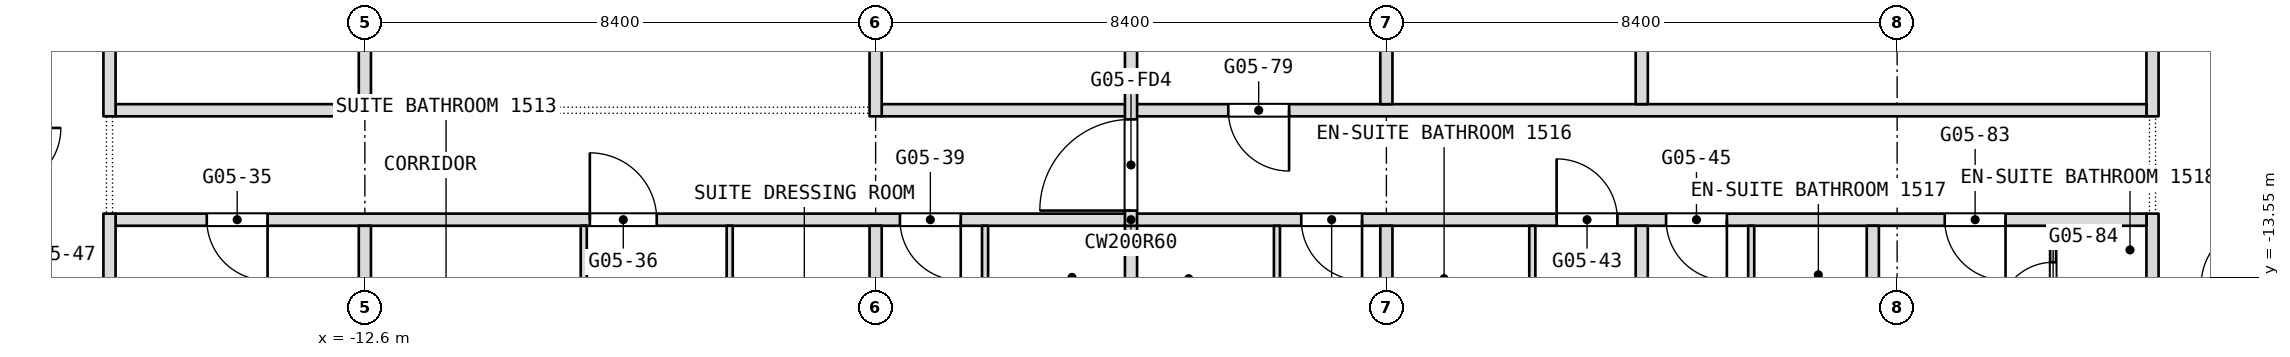
"""IFC4 building model, lengths in metres.
Left out: names, types, materials, properties, quantities, classifications, styles, units other than length and angle.
Written with IfcOpenShell. Run it as: python <this file> out.ifc"""

import sys

from ifc_helpers import new_model, si_unit, direction, frame, frame_2d, origin, place, context, subcontext, project, spatial, rectangle, extrude, element, fill, save


model = new_model("IFC4")
c1 = context("Model", 3, precision=1e-05, world=origin(), true_north=direction((0.0, 1.0)))
c2 = subcontext(c1, "Body", "Model", "MODEL_VIEW")
j1 = project(units=[si_unit("LENGTHUNIT", "METRE"), si_unit("PLANEANGLEUNIT", "RADIAN")], contexts=[c1])
p1 = place(None, origin())
s1 = spatial("IfcSite", under=j1, at=p1, CompositionType="ELEMENT")
p2 = place(p1, origin())
s2 = spatial("IfcBuilding", under=s1, at=p2, CompositionType="ELEMENT")
p3 = place(p2, frame((0.0, 0.0, 68.9)))
s3 = spatial("IfcBuildingStorey", under=s2, at=p3, CompositionType="ELEMENT", Elevation=68.9)
p4 = place(p3, frame((16.8, -17.143, 0.0), z_axis=(0.0, 0.0, 1.0), x_axis=(0.0, 1.0, 0.0)))
e1 = element("IfcWall", 1, at=p4, inside=s3, PredefinedType="PARTITIONING", context=c2, shape_type="SweptSolid", body=[
    extrude(rectangle(XDim=4.643, YDim=0.2, at=frame_2d((2.322, 0.0))), origin(), (0.0, 0.0, 1.0), 3.34),
])
p5 = place(p4, frame((0.772, 0.0, 0.0)))
e2 = element("IfcOpeningElement", 2, at=p5, cuts=e1, PredefinedType="OPENING", context=c2, shape_type="SweptSolid", body=[
    extrude(rectangle(XDim=0.9, YDim=2.1, at=frame_2d((0.45, 1.05))), frame((0.0, 0.1, 0.0), z_axis=(0.0, -1.0, 0.0), x_axis=(1.0, 0.0, 0.0)), (0.0, 0.0, 1.0), 0.2),
])
p6 = place(p3, frame((16.8, -10.9, 0.0), z_axis=(0.0, 0.0, 1.0), x_axis=(0.0, 1.0, 0.0)))
e3 = element("IfcWall", 3, at=p6, inside=s3, PredefinedType="PARTITIONING", context=c2, shape_type="SweptSolid", body=[
    extrude(rectangle(XDim=7.3, YDim=0.2, at=frame_2d((3.65, 0.0))), origin(), (0.0, 0.0, 1.0), 3.34),
])
p7 = place(p6, frame((3.15, 0.0, 0.0)))
e4 = element("IfcOpeningElement", 4, at=p7, cuts=e3, PredefinedType="OPENING", context=c2, shape_type="SweptSolid", body=[
    extrude(rectangle(XDim=1.0, YDim=2.1, at=frame_2d((0.5, 1.05))), frame((0.0, 0.1, 0.0), z_axis=(0.0, -1.0, 0.0), x_axis=(1.0, 0.0, 0.0)), (0.0, 0.0, 1.0), 0.2),
])
p8 = place(p3, frame((15.166, -15.0, 0.0), z_axis=(0.0, 0.0, 1.0), x_axis=(0.0, 1.0, 0.0)))
e5 = element("IfcWall", 5, at=p8, inside=s3, PredefinedType="PARTITIONING", context=c2, shape_type="SweptSolid", body=[
    extrude(rectangle(XDim=2.3, YDim=0.1, at=frame_2d((1.15, 0.0))), origin(), (0.0, 0.0, 1.0), 3.34),
])
p9 = place(p8, frame((0.8, 0.0, 0.0)))
e6 = element("IfcOpeningElement", 6, at=p9, cuts=e5, PredefinedType="OPENING", context=c2, shape_type="SweptSolid", body=[
    extrude(rectangle(XDim=0.9, YDim=2.1, at=frame_2d((0.45, 1.05))), frame((0.0, 0.05, 0.0), z_axis=(0.0, -1.0, 0.0), x_axis=(1.0, 0.0, 0.0)), (0.0, 0.0, 1.0), 0.1),
])
p10 = place(p3, frame((-16.7, -12.6, 0.0), z_axis=(0.0, 0.0, 1.0), x_axis=(1.0, 0.0, 0.0)))
e7 = element("IfcWall", 7, at=p10, inside=s3, PredefinedType="PARTITIONING", context=c2, shape_type="SweptSolid", body=[
    extrude(rectangle(XDim=33.4, YDim=0.2, at=frame_2d((16.7, 0.0))), origin(), (0.0, 0.0, 1.0), 3.34),
])
p11 = place(p10, frame((1.5, 0.0, 0.0)))
e8 = element("IfcOpeningElement", 8, at=p11, cuts=e7, PredefinedType="OPENING", context=c2, shape_type="SweptSolid", body=[
    extrude(rectangle(XDim=1.0, YDim=2.1, at=frame_2d((0.5, 1.05))), frame((0.0, 0.1, 0.0), z_axis=(0.0, -1.0, 0.0), x_axis=(1.0, 0.0, 0.0)), (0.0, 0.0, 1.0), 0.2),
])
p12 = place(p10, frame((7.8, 0.0, 0.0)))
e9 = element("IfcOpeningElement", 9, at=p12, cuts=e7, PredefinedType="OPENING", context=c2, shape_type="SweptSolid", body=[
    extrude(rectangle(XDim=1.1, YDim=2.1, at=frame_2d((0.55, 1.05))), frame((0.0, 0.1, 0.0), z_axis=(0.0, -1.0, 0.0), x_axis=(1.0, 0.0, 0.0)), (0.0, 0.0, 1.0), 0.2),
])
p13 = place(p10, frame((12.9, 0.0, 0.0)))
e10 = element("IfcOpeningElement", 10, at=p13, cuts=e7, PredefinedType="OPENING", context=c2, shape_type="SweptSolid", body=[
    extrude(rectangle(XDim=1.0, YDim=2.1, at=frame_2d((0.5, 1.05))), frame((0.0, 0.1, 0.0), z_axis=(0.0, -1.0, 0.0), x_axis=(1.0, 0.0, 0.0)), (0.0, 0.0, 1.0), 0.2),
])
p14 = place(p10, frame((19.5, 0.0, 0.0)))
e11 = element("IfcOpeningElement", 11, at=p14, cuts=e7, PredefinedType="OPENING", context=c2, shape_type="SweptSolid", body=[
    extrude(rectangle(XDim=1.0, YDim=2.1, at=frame_2d((0.5, 1.05))), frame((0.0, 0.1, 0.0), z_axis=(0.0, -1.0, 0.0), x_axis=(1.0, 0.0, 0.0)), (0.0, 0.0, 1.0), 0.2),
])
p15 = place(p10, frame((23.7, 0.0, 0.0)))
e12 = element("IfcOpeningElement", 12, at=p15, cuts=e7, PredefinedType="OPENING", context=c2, shape_type="SweptSolid", body=[
    extrude(rectangle(XDim=1.0, YDim=2.1, at=frame_2d((0.5, 1.05))), frame((0.0, 0.1, 0.0), z_axis=(0.0, -1.0, 0.0), x_axis=(1.0, 0.0, 0.0)), (0.0, 0.0, 1.0), 0.2),
])
p16 = place(p10, frame((25.5, 0.0, 0.0)))
e13 = element("IfcOpeningElement", 13, at=p16, cuts=e7, PredefinedType="OPENING", context=c2, shape_type="SweptSolid", body=[
    extrude(rectangle(XDim=1.0, YDim=2.1, at=frame_2d((0.5, 1.05))), frame((0.0, 0.1, 0.0), z_axis=(0.0, -1.0, 0.0), x_axis=(1.0, 0.0, 0.0)), (0.0, 0.0, 1.0), 0.2),
])
p17 = place(p10, frame((30.083, 0.0, 0.0)))
e14 = element("IfcOpeningElement", 14, at=p17, cuts=e7, PredefinedType="OPENING", context=c2, shape_type="SweptSolid", body=[
    extrude(rectangle(XDim=1.0, YDim=2.1, at=frame_2d((0.5, 1.05))), frame((0.0, 0.1, 0.0), z_axis=(0.0, -1.0, 0.0), x_axis=(1.0, 0.0, 0.0)), (0.0, 0.0, 1.0), 0.2),
])
p18 = place(p3, frame((12.2, -15.325, 0.0), z_axis=(0.0, 0.0, 1.0), x_axis=(0.0, 1.0, 0.0)))
e15 = element("IfcWall", 15, at=p18, inside=s3, PredefinedType="PARTITIONING", context=c2, shape_type="SweptSolid", body=[
    extrude(rectangle(XDim=2.625, YDim=0.2, at=frame_2d((1.312, 0.0))), origin(), (0.0, 0.0, 1.0), 3.34),
])
p19 = place(p3, frame((-16.7, -10.8, 0.0), z_axis=(0.0, 0.0, 1.0), x_axis=(1.0, 0.0, 0.0)))
e16 = element("IfcWall", 16, at=p19, inside=s3, PredefinedType="PARTITIONING", context=c2, shape_type="SweptSolid", body=[
    extrude(rectangle(XDim=4.0, YDim=0.2, at=frame_2d((2.0, 0.0))), origin(), (0.0, 0.0, 1.0), 3.34),
])
p20 = place(p3, frame((-4.1, -10.8, 0.0), z_axis=(0.0, 0.0, 1.0), x_axis=(1.0, 0.0, 0.0)))
e17 = element("IfcWall", 17, at=p20, inside=s3, PredefinedType="PARTITIONING", context=c2, shape_type="SweptSolid", body=[
    extrude(rectangle(XDim=20.8, YDim=0.2, at=frame_2d((10.4, 0.0))), origin(), (0.0, 0.0, 1.0), 3.34),
])
p21 = place(p20, frame((5.7, 0.0, 0.0)))
e18 = element("IfcOpeningElement", 18, at=p21, cuts=e17, PredefinedType="OPENING", context=c2, shape_type="SweptSolid", body=[
    extrude(rectangle(XDim=1.0, YDim=2.1, at=frame_2d((0.5, 1.05))), frame((0.0, 0.1, 0.0), z_axis=(0.0, -1.0, 0.0), x_axis=(1.0, 0.0, 0.0)), (0.0, 0.0, 1.0), 0.2),
])
p22 = place(p3, frame((10.2, -15.425, 0.0), z_axis=(0.0, 0.0, 1.0), x_axis=(0.0, 1.0, 0.0)))
e19 = element("IfcWall", 19, at=p22, inside=s3, PredefinedType="PARTITIONING", context=c2, shape_type="SweptSolid", body=[
    extrude(rectangle(XDim=2.725, YDim=0.1, at=frame_2d((1.363, 0.0))), origin(), (0.0, 0.0, 1.0), 3.34),
])
p23 = place(p3, frame((8.4, -17.7, 0.0), z_axis=(0.0, 0.0, 1.0), x_axis=(0.0, 1.0, 0.0)))
e20 = element("IfcWall", 20, at=p23, inside=s3, PredefinedType="PARTITIONING", context=c2, shape_type="SweptSolid", body=[
    extrude(rectangle(XDim=5.0, YDim=0.2, at=frame_2d((2.5, 0.0))), origin(), (0.0, 0.0, 1.0), 3.34),
])
p24 = place(p3, frame((8.4, -10.7, 0.0), z_axis=(0.0, 0.0, 1.0), x_axis=(0.0, 1.0, 0.0)))
e21 = element("IfcWall", 21, at=p24, inside=s3, PredefinedType="PARTITIONING", context=c2, shape_type="SweptSolid", body=[
    extrude(rectangle(XDim=3.6, YDim=0.2, at=frame_2d((1.8, 0.0))), origin(), (0.0, 0.0, 1.0), 3.34),
])
p25 = place(p3, frame((6.6, -15.325, 0.0), z_axis=(0.0, 0.0, 1.0), x_axis=(0.0, 1.0, 0.0)))
e22 = element("IfcWall", 22, at=p25, inside=s3, PredefinedType="PARTITIONING", context=c2, shape_type="SweptSolid", body=[
    extrude(rectangle(XDim=2.625, YDim=0.1, at=frame_2d((1.312, 0.0))), origin(), (0.0, 0.0, 1.0), 3.34),
])
p26 = place(p3, frame((4.2, -17.7, 0.0), z_axis=(0.0, 0.0, 1.0), x_axis=(0.0, 1.0, 0.0)))
e23 = element("IfcWall", 23, at=p26, inside=s3, PredefinedType="PARTITIONING", context=c2, shape_type="SweptSolid", body=[
    extrude(rectangle(XDim=5.0, YDim=0.2, at=frame_2d((2.5, 0.0))), origin(), (0.0, 0.0, 1.0), 3.34),
])
p27 = place(p3, frame((4.2, -10.7, 0.0), z_axis=(0.0, 0.0, 1.0), x_axis=(0.0, 1.0, 0.0)))
e24 = element("IfcWall", 24, at=p27, inside=s3, PredefinedType="PARTITIONING", context=c2, shape_type="SweptSolid", body=[
    extrude(rectangle(XDim=8.8, YDim=0.2, at=frame_2d((4.4, 0.0))), origin(), (0.0, 0.0, 1.0), 3.34),
])
p28 = place(p3, frame((2.4, -15.325, 0.0), z_axis=(0.0, 0.0, 1.0), x_axis=(0.0, 1.0, 0.0)))
e25 = element("IfcWall", 25, at=p28, inside=s3, PredefinedType="PARTITIONING", context=c2, shape_type="SweptSolid", body=[
    extrude(rectangle(XDim=2.625, YDim=0.1, at=frame_2d((1.312, 0.0))), origin(), (0.0, 0.0, 1.0), 3.34),
])
p29 = place(p3, frame((0.0, -17.7, 0.0), z_axis=(0.0, 0.0, 1.0), x_axis=(0.0, 1.0, 0.0)))
e26 = element("IfcWall", 26, at=p29, inside=s3, PredefinedType="PARTITIONING", context=c2, shape_type="SweptSolid", body=[
    extrude(rectangle(XDim=5.0, YDim=0.2, at=frame_2d((2.5, 0.0))), origin(), (0.0, 0.0, 1.0), 3.34),
])
p30 = place(p3, frame((0.0, -12.7, 0.0), z_axis=(0.0, 0.0, 1.0), x_axis=(0.0, 1.0, 0.0)))
e27 = element("IfcWall", 27, at=p30, inside=s3, PredefinedType="PARTITIONING", context=c2, shape_type="SweptSolid", body=[
    extrude(rectangle(XDim=12.7, YDim=0.2, at=frame_2d((6.35, 0.0))), origin(), (0.0, 0.0, 1.0), 3.34),
])
p31 = place(p30, frame((11.05, 0.0, 0.0)))
e28 = element("IfcOpeningElement", 28, at=p31, cuts=e27, PredefinedType="OPENING", context=c2, shape_type="SweptSolid", body=[
    extrude(rectangle(XDim=1.5, YDim=2.1, at=frame_2d((0.75, 1.05))), frame((0.0, 0.1, 0.0), z_axis=(0.0, -1.0, 0.0), x_axis=(1.0, 0.0, 0.0)), (0.0, 0.0, 1.0), 0.2),
])
p32 = place(p30, frame((0.25, 0.0, 0.0)))
e29 = element("IfcOpeningElement", 29, at=p32, cuts=e27, PredefinedType="OPENING", context=c2, shape_type="SweptSolid", body=[
    extrude(rectangle(XDim=1.5, YDim=2.1, at=frame_2d((0.75, 1.05))), frame((0.0, 0.1, 0.0), z_axis=(0.0, -1.0, 0.0), x_axis=(1.0, 0.0, 0.0)), (0.0, 0.0, 1.0), 0.2),
])
p33 = place(p3, frame((-2.4, -15.425, 0.0), z_axis=(0.0, 0.0, 1.0), x_axis=(0.0, 1.0, 0.0)))
e30 = element("IfcWall", 30, at=p33, inside=s3, PredefinedType="PARTITIONING", context=c2, shape_type="SweptSolid", body=[
    extrude(rectangle(XDim=2.725, YDim=0.1, at=frame_2d((1.363, 0.0))), origin(), (0.0, 0.0, 1.0), 3.34),
])
p34 = place(p3, frame((-4.2, -17.7, 0.0), z_axis=(0.0, 0.0, 1.0), x_axis=(0.0, 1.0, 0.0)))
e31 = element("IfcWall", 31, at=p34, inside=s3, PredefinedType="PARTITIONING", context=c2, shape_type="SweptSolid", body=[
    extrude(rectangle(XDim=5.0, YDim=0.2, at=frame_2d((2.5, 0.0))), origin(), (0.0, 0.0, 1.0), 3.34),
])
p35 = place(p3, frame((-4.2, -10.9, 0.0), z_axis=(0.0, 0.0, 1.0), x_axis=(0.0, 1.0, 0.0)))
e32 = element("IfcWall", 32, at=p35, inside=s3, PredefinedType="PARTITIONING", context=c2, shape_type="SweptSolid", body=[
    extrude(rectangle(XDim=9.0, YDim=0.2, at=frame_2d((4.5, 0.0))), origin(), (0.0, 0.0, 1.0), 3.34),
])
p36 = place(p35, frame((4.0, 0.0, 0.0)))
e33 = element("IfcOpeningElement", 33, at=p36, cuts=e32, PredefinedType="OPENING", context=c2, shape_type="SweptSolid", body=[
    extrude(rectangle(XDim=1.0, YDim=2.1, at=frame_2d((0.5, 1.05))), frame((0.0, 0.1, 0.0), z_axis=(0.0, -1.0, 0.0), x_axis=(1.0, 0.0, 0.0)), (0.0, 0.0, 1.0), 0.2),
])
p37 = place(p3, frame((-6.6, -16.25, 0.0), z_axis=(0.0, 0.0, 1.0), x_axis=(0.0, 1.0, 0.0)))
e34 = element("IfcWall", 34, at=p37, inside=s3, PredefinedType="PARTITIONING", context=c2, shape_type="SweptSolid", body=[
    extrude(rectangle(XDim=3.55, YDim=0.1, at=frame_2d((1.775, 0.0))), origin(), (0.0, 0.0, 1.0), 3.34),
])
p38 = place(p3, frame((-9.0, -16.15, 0.0), z_axis=(0.0, 0.0, 1.0), x_axis=(0.0, 1.0, 0.0)))
e35 = element("IfcWall", 35, at=p38, inside=s3, PredefinedType="PARTITIONING", context=c2, shape_type="SweptSolid", body=[
    extrude(rectangle(XDim=3.45, YDim=0.1, at=frame_2d((1.725, 0.0))), origin(), (0.0, 0.0, 1.0), 3.34),
])
p39 = place(p38, frame((0.94, 0.0, 0.0)))
e36 = element("IfcOpeningElement", 36, at=p39, cuts=e35, PredefinedType="OPENING", context=c2, shape_type="SweptSolid", body=[
    extrude(rectangle(XDim=0.9, YDim=2.1, at=frame_2d((0.45, 1.05))), frame((0.0, 0.05, 0.0), z_axis=(0.0, -1.0, 0.0), x_axis=(1.0, 0.0, 0.0)), (0.0, 0.0, 1.0), 0.1),
])
p40 = place(p3, frame((-12.6, -17.7, 0.0), z_axis=(0.0, 0.0, 1.0), x_axis=(0.0, 1.0, 0.0)))
e37 = element("IfcWall", 37, at=p40, inside=s3, PredefinedType="PARTITIONING", context=c2, shape_type="SweptSolid", body=[
    extrude(rectangle(XDim=5.0, YDim=0.2, at=frame_2d((2.5, 0.0))), origin(), (0.0, 0.0, 1.0), 3.34),
])
p41 = place(p3, frame((-12.6, -10.9, 0.0), z_axis=(0.0, 0.0, 1.0), x_axis=(0.0, 1.0, 0.0)))
e38 = element("IfcWall", 38, at=p41, inside=s3, PredefinedType="PARTITIONING", context=c2, shape_type="SweptSolid", body=[
    extrude(rectangle(XDim=5.6, YDim=0.2, at=frame_2d((2.8, 0.0))), origin(), (0.0, 0.0, 1.0), 3.34),
])
p42 = place(p3, frame((-16.8, -17.143, 0.0), z_axis=(0.0, 0.0, 1.0), x_axis=(0.0, 1.0, 0.0)))
e39 = element("IfcWall", 39, at=p42, inside=s3, PredefinedType="PARTITIONING", context=c2, shape_type="SweptSolid", body=[
    extrude(rectangle(XDim=4.643, YDim=0.2, at=frame_2d((2.322, 0.0))), origin(), (0.0, 0.0, 1.0), 3.34),
])
p43 = place(p3, frame((-16.8, -10.9, 0.0), z_axis=(0.0, 0.0, 1.0), x_axis=(0.0, 1.0, 0.0)))
e40 = element("IfcWall", 40, at=p43, inside=s3, PredefinedType="PARTITIONING", context=c2, shape_type="SweptSolid", body=[
    extrude(rectangle(XDim=9.0, YDim=0.2, at=frame_2d((4.5, 0.0))), origin(), (0.0, 0.0, 1.0), 3.34),
])
p44 = place(p9, origin())
e41 = element("IfcDoor", 41, at=p44, inside=s3, OperationType="SINGLE_SWING_RIGHT", PredefinedType="DOOR", context=c2, shape_type="SweptSolid", body=[
    extrude(rectangle(XDim=0.9, YDim=2.1, at=frame_2d((0.45, 1.05))), frame((0.0, 0.025, 0.0), z_axis=(0.0, -1.0, 0.0), x_axis=(1.0, 0.0, 0.0)), (0.0, 0.0, 1.0), 0.05),
])
fill(e6, e41)
p45 = place(p11, origin())
e42 = element("IfcDoor", 42, at=p45, inside=s3, OperationType="SINGLE_SWING_RIGHT", PredefinedType="DOOR", context=c2, shape_type="SweptSolid", body=[
    extrude(rectangle(XDim=1.0, YDim=2.1, at=frame_2d((0.5, 1.05))), frame((0.0, 0.025, 0.0), z_axis=(0.0, -1.0, 0.0), x_axis=(1.0, 0.0, 0.0)), (0.0, 0.0, 1.0), 0.05),
])
fill(e8, e42)
p46 = place(p12, origin())
e43 = element("IfcDoor", 43, at=p46, inside=s3, OperationType="SINGLE_SWING_RIGHT", PredefinedType="DOOR", context=c2, shape_type="SweptSolid", body=[
    extrude(rectangle(XDim=1.1, YDim=2.1, at=frame_2d((0.55, 1.05))), frame((0.0, 0.025, 0.0), z_axis=(0.0, -1.0, 0.0), x_axis=(1.0, 0.0, 0.0)), (0.0, 0.0, 1.0), 0.05),
])
fill(e9, e43)
p47 = place(p13, origin())
e44 = element("IfcDoor", 44, at=p47, inside=s3, OperationType="SINGLE_SWING_LEFT", PredefinedType="DOOR", context=c2, shape_type="SweptSolid", body=[
    extrude(rectangle(XDim=1.0, YDim=2.1, at=frame_2d((0.5, 1.05))), frame((0.0, 0.025, 0.0), z_axis=(0.0, -1.0, 0.0), x_axis=(1.0, 0.0, 0.0)), (0.0, 0.0, 1.0), 0.05),
])
fill(e10, e44)
p48 = place(p14, origin())
e45 = element("IfcDoor", 45, at=p48, inside=s3, OperationType="SINGLE_SWING_LEFT", PredefinedType="DOOR", context=c2, shape_type="SweptSolid", body=[
    extrude(rectangle(XDim=1.0, YDim=2.1, at=frame_2d((0.5, 1.05))), frame((0.0, 0.025, 0.0), z_axis=(0.0, -1.0, 0.0), x_axis=(1.0, 0.0, 0.0)), (0.0, 0.0, 1.0), 0.05),
])
fill(e11, e45)
p49 = place(p15, origin())
e46 = element("IfcDoor", 46, at=p49, inside=s3, OperationType="SINGLE_SWING_LEFT", PredefinedType="DOOR", context=c2, shape_type="SweptSolid", body=[
    extrude(rectangle(XDim=1.0, YDim=2.1, at=frame_2d((0.5, 1.05))), frame((0.0, 0.025, 0.0), z_axis=(0.0, -1.0, 0.0), x_axis=(1.0, 0.0, 0.0)), (0.0, 0.0, 1.0), 0.05),
])
fill(e12, e46)
p50 = place(p16, origin())
e47 = element("IfcDoor", 47, at=p50, inside=s3, OperationType="SINGLE_SWING_LEFT", PredefinedType="DOOR", context=c2, shape_type="SweptSolid", body=[
    extrude(rectangle(XDim=1.0, YDim=2.1, at=frame_2d((0.5, 1.05))), frame((0.0, 0.025, 0.0), z_axis=(0.0, -1.0, 0.0), x_axis=(1.0, 0.0, 0.0)), (0.0, 0.0, 1.0), 0.05),
])
fill(e13, e47)
p51 = place(p17, origin())
e48 = element("IfcDoor", 48, at=p51, inside=s3, OperationType="SINGLE_SWING_LEFT", PredefinedType="DOOR", context=c2, shape_type="SweptSolid", body=[
    extrude(rectangle(XDim=1.0, YDim=2.1, at=frame_2d((0.5, 1.05))), frame((0.0, 0.025, 0.0), z_axis=(0.0, -1.0, 0.0), x_axis=(1.0, 0.0, 0.0)), (0.0, 0.0, 1.0), 0.05),
])
fill(e14, e48)
p52 = place(p21, origin())
e49 = element("IfcDoor", 49, at=p52, inside=s3, OperationType="SINGLE_SWING_LEFT", PredefinedType="DOOR", context=c2, shape_type="SweptSolid", body=[
    extrude(rectangle(XDim=1.0, YDim=2.1, at=frame_2d((0.5, 1.05))), frame((0.0, 0.025, 0.0), z_axis=(0.0, -1.0, 0.0), x_axis=(1.0, 0.0, 0.0)), (0.0, 0.0, 1.0), 0.05),
])
fill(e18, e49)
p53 = place(p32, origin())
e50 = element("IfcDoor", 50, at=p53, inside=s3, OperationType="DOUBLE_DOOR_DOUBLE_SWING", PredefinedType="DOOR", context=c2, shape_type="SweptSolid", body=[
    extrude(rectangle(XDim=1.5, YDim=2.1, at=frame_2d((0.75, 1.05))), frame((0.0, 0.025, 0.0), z_axis=(0.0, -1.0, 0.0), x_axis=(1.0, 0.0, 0.0)), (0.0, 0.0, 1.0), 0.05),
])
fill(e29, e50)
save(model, sys.argv[1])
